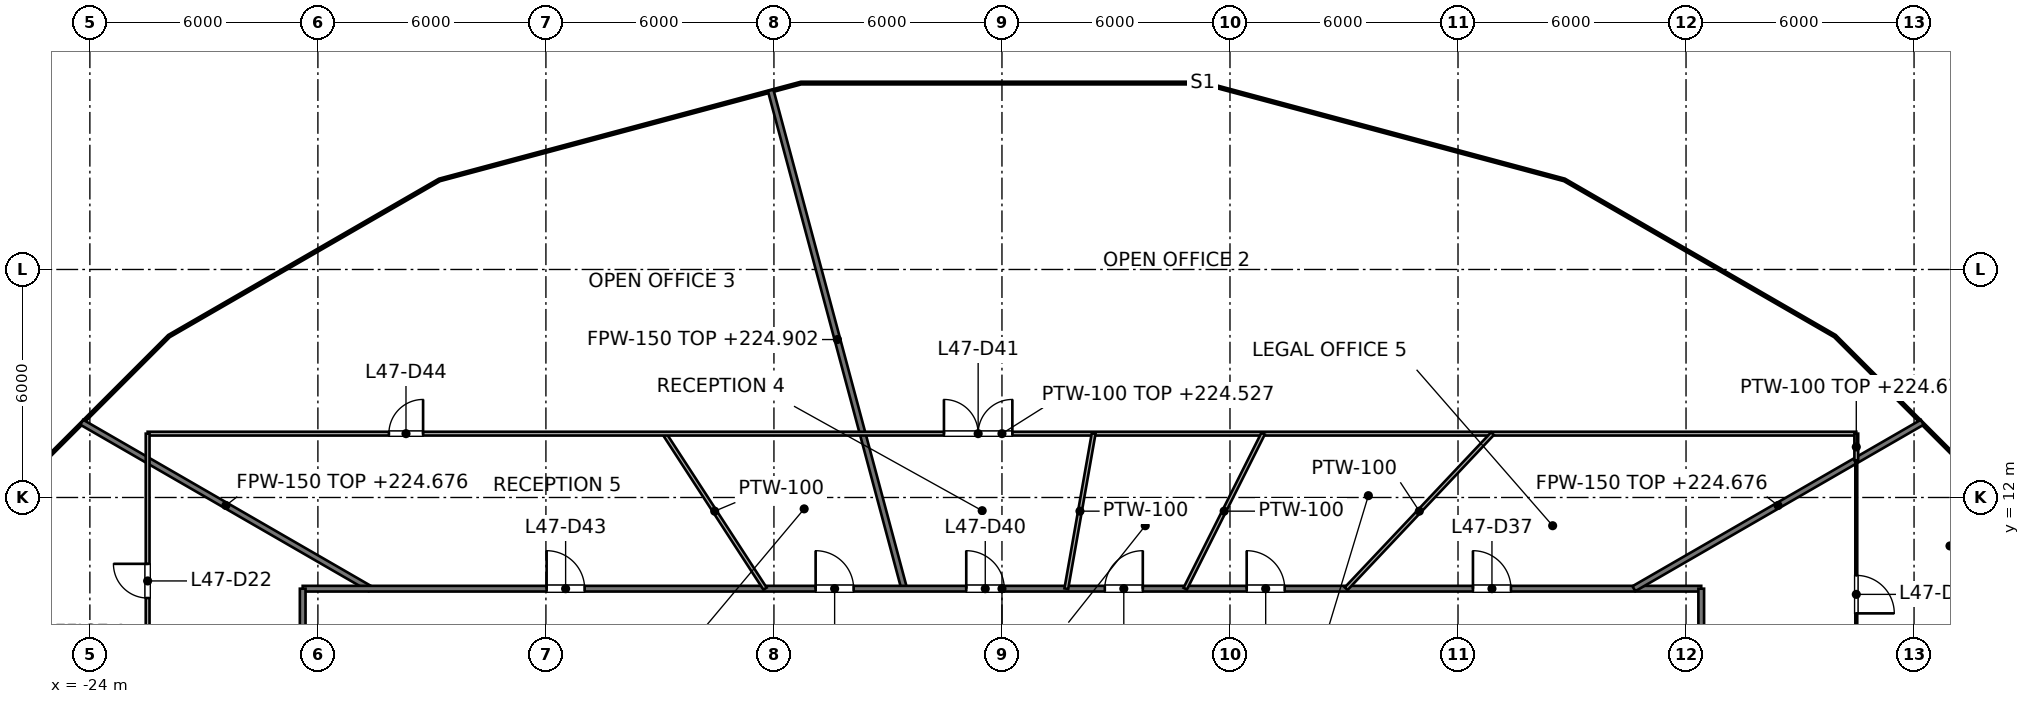
"""IFC4 building model, lengths in metres.
Left out: names, types, materials, properties, quantities, classifications, styles, units other than length and angle.
Written with IfcOpenShell. Run it as: python <this file> out.ifc"""

import sys

from ifc_helpers import new_model, si_unit, direction, frame, frame_2d, origin, place, context, subcontext, project, spatial, rectangle, extrude, element, fill, save


model = new_model("IFC4")
c1 = context("Model", 3, precision=1e-05, world=origin(), true_north=direction((0.0, 1.0)))
c2 = subcontext(c1, "Body", "Model", "MODEL_VIEW")
j1 = project(units=[si_unit("LENGTHUNIT", "METRE"), si_unit("PLANEANGLEUNIT", "RADIAN")], contexts=[c1])
p1 = place(None, origin())
s1 = spatial("IfcSite", under=j1, at=p1, CompositionType="ELEMENT")
p2 = place(p1, origin())
s2 = spatial("IfcBuilding", under=s1, at=p2, CompositionType="ELEMENT")
p3 = place(p2, frame((0.0, 0.0, 221.6)))
s3 = spatial("IfcBuildingStorey", under=s2, at=p3, CompositionType="ELEMENT", Elevation=221.6)
p4 = place(p3, frame((-6.086, 22.713, 0.0), z_axis=(0.0, 0.0, 1.0), x_axis=(0.258822080859, -0.965925012855, 0.0)))
e1 = element("IfcWall", 1, at=p4, inside=s3, PredefinedType="PARTITIONING", context=c2, shape_type="SweptSolid", body=[
    extrude(rectangle(XDim=13.576, YDim=0.15, at=frame_2d((6.788, 0.0))), origin(), (0.0, 0.0, 1.0), 3.302),
])
p5 = place(p3, frame((-24.214, 13.98, 0.0), z_axis=(0.0, 0.0, 1.0), x_axis=(0.866025463095, -0.499999897272, 0.0)))
e2 = element("IfcWall", 2, at=p5, inside=s3, PredefinedType="PARTITIONING", context=c2, shape_type="SweptSolid", body=[
    extrude(rectangle(XDim=8.76, YDim=0.15, at=frame_2d((4.38, 0.0))), origin(), (0.0, 0.0, 1.0), 3.076),
])
p6 = place(p3, frame((-18.4, 9.6, 0.0), z_axis=(0.0, 0.0, 1.0), x_axis=(1.0, 0.0, 0.0)))
e3 = element("IfcWall", 3, at=p6, inside=s3, PredefinedType="PARTITIONING", context=c2, shape_type="SweptSolid", body=[
    extrude(rectangle(XDim=36.8, YDim=0.15, at=frame_2d((18.4, 0.0))), origin(), (0.0, 0.0, 1.0), 2.927),
])
p7 = place(p6, frame((30.793, 0.0, 0.0)))
e4 = element("IfcOpeningElement", 4, at=p7, cuts=e3, PredefinedType="OPENING", context=c2, shape_type="SweptSolid", body=[
    extrude(rectangle(XDim=1.0, YDim=2.1, at=frame_2d((0.5, 1.05))), frame((0.0, 0.075, 0.0), z_axis=(0.0, -1.0, 0.0), x_axis=(1.0, 0.0, 0.0)), (0.0, 0.0, 1.0), 0.15),
])
p8 = place(p6, frame((24.84, 0.0, 0.0)))
e5 = element("IfcOpeningElement", 5, at=p8, cuts=e3, PredefinedType="OPENING", context=c2, shape_type="SweptSolid", body=[
    extrude(rectangle(XDim=1.0, YDim=2.1, at=frame_2d((0.5, 1.05))), frame((0.0, 0.075, 0.0), z_axis=(0.0, -1.0, 0.0), x_axis=(1.0, 0.0, 0.0)), (0.0, 0.0, 1.0), 0.15),
])
p9 = place(p6, frame((21.106, 0.0, 0.0)))
e6 = element("IfcOpeningElement", 6, at=p9, cuts=e3, PredefinedType="OPENING", context=c2, shape_type="SweptSolid", body=[
    extrude(rectangle(XDim=1.0, YDim=2.1, at=frame_2d((0.5, 1.05))), frame((0.0, 0.075, 0.0), z_axis=(0.0, -1.0, 0.0), x_axis=(1.0, 0.0, 0.0)), (0.0, 0.0, 1.0), 0.15),
])
p10 = place(p6, frame((17.46, 0.0, 0.0)))
e7 = element("IfcOpeningElement", 7, at=p10, cuts=e3, PredefinedType="OPENING", context=c2, shape_type="SweptSolid", body=[
    extrude(rectangle(XDim=1.0, YDim=2.1, at=frame_2d((0.5, 1.05))), frame((0.0, 0.075, 0.0), z_axis=(0.0, -1.0, 0.0), x_axis=(1.0, 0.0, 0.0)), (0.0, 0.0, 1.0), 0.15),
])
p11 = place(p6, frame((13.497, 0.0, 0.0)))
e8 = element("IfcOpeningElement", 8, at=p11, cuts=e3, PredefinedType="OPENING", context=c2, shape_type="SweptSolid", body=[
    extrude(rectangle(XDim=1.0, YDim=2.1, at=frame_2d((0.5, 1.05))), frame((0.0, 0.075, 0.0), z_axis=(0.0, -1.0, 0.0), x_axis=(1.0, 0.0, 0.0)), (0.0, 0.0, 1.0), 0.15),
])
p12 = place(p6, frame((6.418, 0.0, 0.0)))
e9 = element("IfcOpeningElement", 9, at=p12, cuts=e3, PredefinedType="OPENING", context=c2, shape_type="SweptSolid", body=[
    extrude(rectangle(XDim=1.0, YDim=2.1, at=frame_2d((0.5, 1.05))), frame((0.0, 0.075, 0.0), z_axis=(0.0, -1.0, 0.0), x_axis=(1.0, 0.0, 0.0)), (0.0, 0.0, 1.0), 0.15),
])
p13 = place(p3, frame((16.628, 9.6, 0.0), z_axis=(0.0, 0.0, 1.0), x_axis=(0.86607559881, 0.499913049585, 0.0)))
e10 = element("IfcWall", 10, at=p13, inside=s3, PredefinedType="PARTITIONING", context=c2, shape_type="SweptSolid", body=[
    extrude(rectangle(XDim=8.76, YDim=0.15, at=frame_2d((4.38, 0.0))), origin(), (0.0, 0.0, 1.0), 3.076),
])
p14 = place(p3, frame((18.4, -9.6, 0.0), z_axis=(0.0, 0.0, 1.0), x_axis=(0.0, 1.0, 0.0)))
e11 = element("IfcWall", 11, at=p14, inside=s3, PredefinedType="PARTITIONING", context=c2, shape_type="SweptSolid", body=[
    extrude(rectangle(XDim=19.2, YDim=0.15, at=frame_2d((9.6, 0.0))), origin(), (0.0, 0.0, 1.0), 2.918),
])
p15 = place(p14, frame((1.834, 0.0, 0.0)))
e12 = element("IfcOpeningElement", 12, at=p15, cuts=e11, PredefinedType="OPENING", context=c2, shape_type="SweptSolid", body=[
    extrude(rectangle(XDim=1.0, YDim=2.1, at=frame_2d((0.5, 1.05))), frame((0.0, 0.075, 0.0), z_axis=(0.0, -1.0, 0.0), x_axis=(1.0, 0.0, 0.0)), (0.0, 0.0, 1.0), 0.15),
])
p16 = place(p14, frame((6.584, 0.0, 0.0)))
e13 = element("IfcOpeningElement", 13, at=p16, cuts=e11, PredefinedType="OPENING", context=c2, shape_type="SweptSolid", body=[
    extrude(rectangle(XDim=1.0, YDim=2.1, at=frame_2d((0.5, 1.05))), frame((0.0, 0.075, 0.0), z_axis=(0.0, -1.0, 0.0), x_axis=(1.0, 0.0, 0.0)), (0.0, 0.0, 1.0), 0.15),
])
p17 = place(p14, frame((11.514, 0.0, 0.0)))
e14 = element("IfcOpeningElement", 14, at=p17, cuts=e11, PredefinedType="OPENING", context=c2, shape_type="SweptSolid", body=[
    extrude(rectangle(XDim=1.0, YDim=2.1, at=frame_2d((0.5, 1.05))), frame((0.0, 0.075, 0.0), z_axis=(0.0, -1.0, 0.0), x_axis=(1.0, 0.0, 0.0)), (0.0, 0.0, 1.0), 0.15),
])
p18 = place(p14, frame((16.365, 0.0, 0.0)))
e15 = element("IfcOpeningElement", 15, at=p18, cuts=e11, PredefinedType="OPENING", context=c2, shape_type="SweptSolid", body=[
    extrude(rectangle(XDim=1.0, YDim=2.1, at=frame_2d((0.5, 1.05))), frame((0.0, 0.075, 0.0), z_axis=(0.0, -1.0, 0.0), x_axis=(1.0, 0.0, 0.0)), (0.0, 0.0, 1.0), 0.15),
])
p19 = place(p3, frame((-18.4, -9.6, 0.0), z_axis=(0.0, 0.0, 1.0), x_axis=(0.0, 1.0, 0.0)))
e16 = element("IfcWall", 16, at=p19, inside=s3, PredefinedType="PARTITIONING", context=c2, shape_type="SweptSolid", body=[
    extrude(rectangle(XDim=19.2, YDim=0.15, at=frame_2d((9.6, 0.0))), origin(), (0.0, 0.0, 1.0), 2.918),
])
p20 = place(p19, frame((16.655, 0.0, 0.0)))
e17 = element("IfcOpeningElement", 17, at=p20, cuts=e16, PredefinedType="OPENING", context=c2, shape_type="SweptSolid", body=[
    extrude(rectangle(XDim=1.0, YDim=2.1, at=frame_2d((0.5, 1.05))), frame((0.0, 0.075, 0.0), z_axis=(0.0, -1.0, 0.0), x_axis=(1.0, 0.0, 0.0)), (0.0, 0.0, 1.0), 0.15),
])
p21 = place(p19, frame((12.39, 0.0, 0.0)))
e18 = element("IfcOpeningElement", 18, at=p21, cuts=e16, PredefinedType="OPENING", context=c2, shape_type="SweptSolid", body=[
    extrude(rectangle(XDim=1.0, YDim=2.1, at=frame_2d((0.5, 1.05))), frame((0.0, 0.075, 0.0), z_axis=(0.0, -1.0, 0.0), x_axis=(1.0, 0.0, 0.0)), (0.0, 0.0, 1.0), 0.15),
])
p22 = place(p19, frame((7.964, 0.0, 0.0)))
e19 = element("IfcOpeningElement", 19, at=p22, cuts=e16, PredefinedType="OPENING", context=c2, shape_type="SweptSolid", body=[
    extrude(rectangle(XDim=1.0, YDim=2.1, at=frame_2d((0.5, 1.05))), frame((0.0, 0.075, 0.0), z_axis=(0.0, -1.0, 0.0), x_axis=(1.0, 0.0, 0.0)), (0.0, 0.0, 1.0), 0.15),
])
p23 = place(p19, frame((2.627, 0.0, 0.0)))
e20 = element("IfcOpeningElement", 20, at=p23, cuts=e16, PredefinedType="OPENING", context=c2, shape_type="SweptSolid", body=[
    extrude(rectangle(XDim=1.0, YDim=2.1, at=frame_2d((0.5, 1.05))), frame((0.0, 0.075, 0.0), z_axis=(0.0, -1.0, 0.0), x_axis=(1.0, 0.0, 0.0)), (0.0, 0.0, 1.0), 0.15),
])
p24 = place(p3, frame((22.48, -6.024, 0.0), z_axis=(0.0, 0.0, 1.0), x_axis=(0.0, 1.0, 0.0)))
e21 = element("IfcWall", 21, at=p24, inside=s3, PredefinedType="PARTITIONING", context=c2, shape_type="SweptSolid", body=[
    extrude(rectangle(XDim=19.003, YDim=0.05, at=frame_2d((9.501, 0.0))), origin(), (0.0, 0.0, 1.0), 2.918),
])
p25 = place(p24, frame((2.511, 0.0, 0.0)))
e22 = element("IfcOpeningElement", 22, at=p25, cuts=e21, PredefinedType="OPENING", context=c2, shape_type="SweptSolid", body=[
    extrude(rectangle(XDim=1.0, YDim=2.1, at=frame_2d((0.5, 1.05))), frame((0.0, 0.025, 0.0), z_axis=(0.0, -1.0, 0.0), x_axis=(1.0, 0.0, 0.0)), (0.0, 0.0, 1.0), 0.05),
])
p26 = place(p24, frame((8.535, 0.0, 0.0)))
e23 = element("IfcOpeningElement", 23, at=p26, cuts=e21, PredefinedType="OPENING", context=c2, shape_type="SweptSolid", body=[
    extrude(rectangle(XDim=1.0, YDim=2.1, at=frame_2d((0.5, 1.05))), frame((0.0, 0.025, 0.0), z_axis=(0.0, -1.0, 0.0), x_axis=(1.0, 0.0, 0.0)), (0.0, 0.0, 1.0), 0.05),
])
p27 = place(p24, frame((14.974, 0.0, 0.0)))
e24 = element("IfcOpeningElement", 24, at=p27, cuts=e21, PredefinedType="OPENING", context=c2, shape_type="SweptSolid", body=[
    extrude(rectangle(XDim=1.0, YDim=2.1, at=frame_2d((0.5, 1.05))), frame((0.0, 0.025, 0.0), z_axis=(0.0, -1.0, 0.0), x_axis=(1.0, 0.0, 0.0)), (0.0, 0.0, 1.0), 0.05),
])
p28 = place(p3, frame((-8.884, 13.68, 0.0), z_axis=(0.0, 0.0, 1.0), x_axis=(0.544736088182, -0.838607532898, 0.0)))
e25 = element("IfcWall", 25, at=p28, inside=s3, PredefinedType="PARTITIONING", context=c2, shape_type="SweptSolid", body=[
    extrude(rectangle(XDim=4.865, YDim=0.1, at=frame_2d((2.433, 0.0))), origin(), (0.0, 0.0, 1.0), 3.85),
])
p29 = place(p3, frame((-22.48, 13.68, 0.0), z_axis=(0.0, 0.0, 1.0), x_axis=(1.0, 0.0, 0.0)))
e26 = element("IfcWall", 26, at=p29, inside=s3, PredefinedType="PARTITIONING", context=c2, shape_type="SweptSolid", body=[
    extrude(rectangle(XDim=44.96, YDim=0.1, at=frame_2d((22.48, 0.0))), origin(), (0.0, 0.0, 1.0), 2.927),
])
p30 = place(p29, frame((20.954, 0.0, 0.0)))
e27 = element("IfcOpeningElement", 27, at=p30, cuts=e26, PredefinedType="OPENING", context=c2, shape_type="SweptSolid", body=[
    extrude(rectangle(XDim=1.8, YDim=2.1, at=frame_2d((0.9, 1.05))), frame((0.0, 0.05, 0.0), z_axis=(0.0, -1.0, 0.0), x_axis=(1.0, 0.0, 0.0)), (0.0, 0.0, 1.0), 0.1),
])
p31 = place(p29, frame((6.348, 0.0, 0.0)))
e28 = element("IfcOpeningElement", 28, at=p31, cuts=e26, PredefinedType="OPENING", context=c2, shape_type="SweptSolid", body=[
    extrude(rectangle(XDim=0.9, YDim=2.1, at=frame_2d((0.45, 1.05))), frame((0.0, 0.05, 0.0), z_axis=(0.0, -1.0, 0.0), x_axis=(1.0, 0.0, 0.0)), (0.0, 0.0, 1.0), 0.1),
])
p32 = place(p3, frame((9.057, 9.6, 0.0), z_axis=(0.0, 0.0, 1.0), x_axis=(0.686333382584, 0.727287073961, 0.0)))
e29 = element("IfcWall", 29, at=p32, inside=s3, PredefinedType="PARTITIONING", context=c2, shape_type="SweptSolid", body=[
    extrude(rectangle(XDim=5.61, YDim=0.1, at=frame_2d((2.805, 0.0))), origin(), (0.0, 0.0, 1.0), 3.85),
])
p33 = place(p3, frame((4.822, 9.6, 0.0), z_axis=(0.0, 0.0, 1.0), x_axis=(0.448817131352, 0.89362362469, 0.0)))
e30 = element("IfcWall", 30, at=p33, inside=s3, PredefinedType="PARTITIONING", context=c2, shape_type="SweptSolid", body=[
    extrude(rectangle(XDim=4.565, YDim=0.1, at=frame_2d((2.283, 0.0))), origin(), (0.0, 0.0, 1.0), 3.85),
])
p34 = place(p3, frame((1.693, 9.6, 0.0), z_axis=(0.0, 0.0, 1.0), x_axis=(0.173556717923, 0.984823875454, 0.0)))
e31 = element("IfcWall", 31, at=p34, inside=s3, PredefinedType="PARTITIONING", context=c2, shape_type="SweptSolid", body=[
    extrude(rectangle(XDim=4.143, YDim=0.1, at=frame_2d((2.071, 0.0))), origin(), (0.0, 0.0, 1.0), 3.85),
])
p35 = place(p3, frame((22.48, 12.979, 0.0), z_axis=(0.0, 0.0, 1.0), x_axis=(0.0, 1.0, 0.0)))
e32 = element("IfcWall", 32, at=p35, inside=s3, PredefinedType="PARTITIONING", context=c2, shape_type="SweptSolid", body=[
    extrude(rectangle(XDim=0.701, YDim=0.1, at=frame_2d((0.351, 0.0))), origin(), (0.0, 0.0, 1.0), 3.076),
])
p36 = place(p3, frame((-22.48, -5.728, 0.0), z_axis=(0.0, 0.0, 1.0), x_axis=(0.0, 1.0, 0.0)))
e33 = element("IfcWall", 33, at=p36, inside=s3, PredefinedType="PARTITIONING", context=c2, shape_type="SweptSolid", body=[
    extrude(rectangle(XDim=19.408, YDim=0.1, at=frame_2d((9.704, 0.0))), origin(), (0.0, 0.0, 1.0), 2.918),
])
p37 = place(p36, frame((15.082, 0.0, 0.0)))
e34 = element("IfcOpeningElement", 34, at=p37, cuts=e33, PredefinedType="OPENING", context=c2, shape_type="SweptSolid", body=[
    extrude(rectangle(XDim=0.9, YDim=2.1, at=frame_2d((0.45, 1.05))), frame((0.0, 0.05, 0.0), z_axis=(0.0, -1.0, 0.0), x_axis=(1.0, 0.0, 0.0)), (0.0, 0.0, 1.0), 0.1),
])
p38 = place(p37, origin())
e35 = element("IfcDoor", 35, at=p38, inside=s3, OperationType="SINGLE_SWING_RIGHT", PredefinedType="DOOR", context=c2, shape_type="SweptSolid", body=[
    extrude(rectangle(XDim=0.9, YDim=2.1, at=frame_2d((0.45, 1.05))), frame((0.0, 0.025, 0.0), z_axis=(0.0, -1.0, 0.0), x_axis=(1.0, 0.0, 0.0)), (0.0, 0.0, 1.0), 0.05),
])
fill(e34, e35)
p39 = place(p27, origin())
e36 = element("IfcDoor", 36, at=p39, inside=s3, OperationType="SINGLE_SWING_LEFT", PredefinedType="DOOR", context=c2, shape_type="SweptSolid", body=[
    extrude(rectangle(XDim=1.0, YDim=2.1, at=frame_2d((0.5, 1.05))), frame((0.0, 0.025, 0.0), z_axis=(0.0, -1.0, 0.0), x_axis=(1.0, 0.0, 0.0)), (0.0, 0.0, 1.0), 0.05),
])
fill(e24, e36)
p40 = place(p7, origin())
e37 = element("IfcDoor", 37, at=p40, inside=s3, OperationType="SINGLE_SWING_LEFT", PredefinedType="DOOR", context=c2, shape_type="SweptSolid", body=[
    extrude(rectangle(XDim=1.0, YDim=2.1, at=frame_2d((0.5, 1.05))), frame((0.0, 0.025, 0.0), z_axis=(0.0, -1.0, 0.0), x_axis=(1.0, 0.0, 0.0)), (0.0, 0.0, 1.0), 0.05),
])
fill(e4, e37)
p41 = place(p8, origin())
e38 = element("IfcDoor", 38, at=p41, inside=s3, OperationType="SINGLE_SWING_LEFT", PredefinedType="DOOR", context=c2, shape_type="SweptSolid", body=[
    extrude(rectangle(XDim=1.0, YDim=2.1, at=frame_2d((0.5, 1.05))), frame((0.0, 0.025, 0.0), z_axis=(0.0, -1.0, 0.0), x_axis=(1.0, 0.0, 0.0)), (0.0, 0.0, 1.0), 0.05),
])
fill(e5, e38)
p42 = place(p9, origin())
e39 = element("IfcDoor", 39, at=p42, inside=s3, OperationType="SINGLE_SWING_RIGHT", PredefinedType="DOOR", context=c2, shape_type="SweptSolid", body=[
    extrude(rectangle(XDim=1.0, YDim=2.1, at=frame_2d((0.5, 1.05))), frame((0.0, 0.025, 0.0), z_axis=(0.0, -1.0, 0.0), x_axis=(1.0, 0.0, 0.0)), (0.0, 0.0, 1.0), 0.05),
])
fill(e6, e39)
p43 = place(p10, origin())
e40 = element("IfcDoor", 40, at=p43, inside=s3, OperationType="SINGLE_SWING_LEFT", PredefinedType="DOOR", context=c2, shape_type="SweptSolid", body=[
    extrude(rectangle(XDim=1.0, YDim=2.1, at=frame_2d((0.5, 1.05))), frame((0.0, 0.025, 0.0), z_axis=(0.0, -1.0, 0.0), x_axis=(1.0, 0.0, 0.0)), (0.0, 0.0, 1.0), 0.05),
])
fill(e7, e40)
p44 = place(p30, origin())
e41 = element("IfcDoor", 41, at=p44, inside=s3, OperationType="DOUBLE_DOOR_SINGLE_SWING", PredefinedType="DOOR", context=c2, shape_type="SweptSolid", body=[
    extrude(rectangle(XDim=1.8, YDim=2.1, at=frame_2d((0.9, 1.05))), frame((0.0, 0.025, 0.0), z_axis=(0.0, -1.0, 0.0), x_axis=(1.0, 0.0, 0.0)), (0.0, 0.0, 1.0), 0.05),
])
fill(e27, e41)
p45 = place(p11, origin())
e42 = element("IfcDoor", 42, at=p45, inside=s3, OperationType="SINGLE_SWING_LEFT", PredefinedType="DOOR", context=c2, shape_type="SweptSolid", body=[
    extrude(rectangle(XDim=1.0, YDim=2.1, at=frame_2d((0.5, 1.05))), frame((0.0, 0.025, 0.0), z_axis=(0.0, -1.0, 0.0), x_axis=(1.0, 0.0, 0.0)), (0.0, 0.0, 1.0), 0.05),
])
fill(e8, e42)
p46 = place(p12, origin())
e43 = element("IfcDoor", 43, at=p46, inside=s3, OperationType="SINGLE_SWING_LEFT", PredefinedType="DOOR", context=c2, shape_type="SweptSolid", body=[
    extrude(rectangle(XDim=1.0, YDim=2.1, at=frame_2d((0.5, 1.05))), frame((0.0, 0.025, 0.0), z_axis=(0.0, -1.0, 0.0), x_axis=(1.0, 0.0, 0.0)), (0.0, 0.0, 1.0), 0.05),
])
fill(e9, e43)
p47 = place(p31, origin())
e44 = element("IfcDoor", 44, at=p47, inside=s3, OperationType="SINGLE_SWING_RIGHT", PredefinedType="DOOR", context=c2, shape_type="SweptSolid", body=[
    extrude(rectangle(XDim=0.9, YDim=2.1, at=frame_2d((0.45, 1.05))), frame((0.0, 0.025, 0.0), z_axis=(0.0, -1.0, 0.0), x_axis=(1.0, 0.0, 0.0)), (0.0, 0.0, 1.0), 0.05),
])
fill(e28, e44)
save(model, sys.argv[1])
